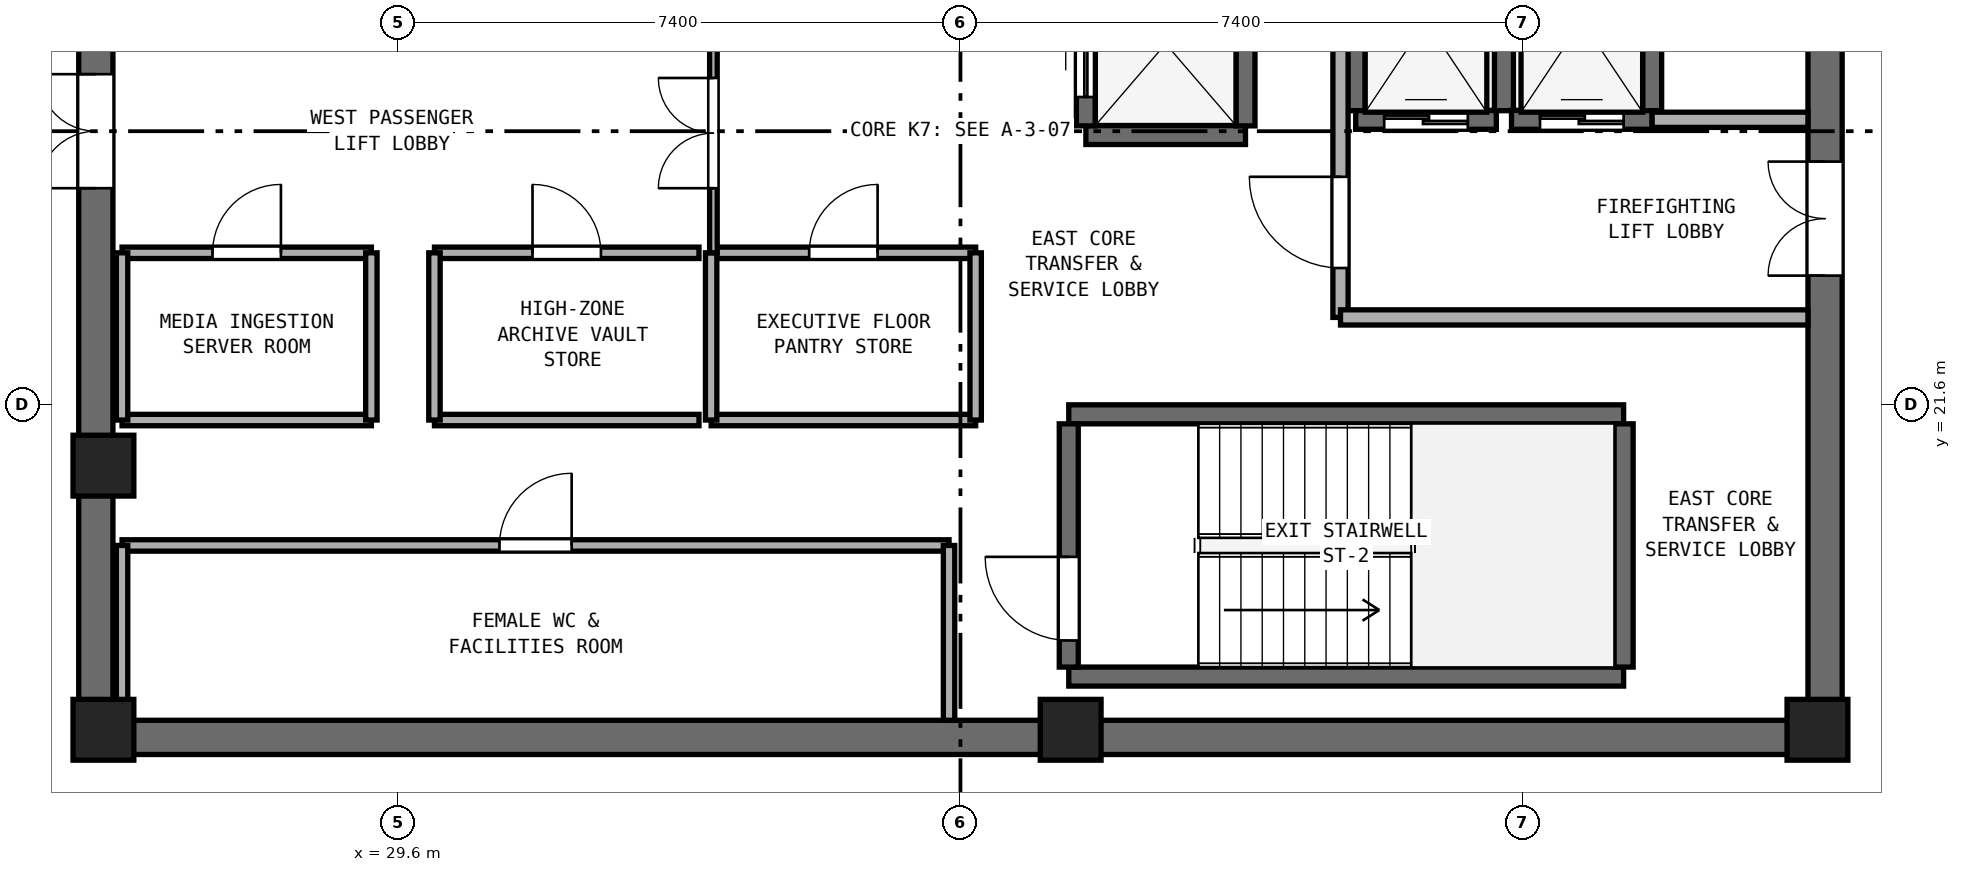
"""IFC4 building model, lengths in metres.
Left out: names, types, materials, properties, quantities, classifications, styles, units other than length and angle.
Written with IfcOpenShell. Run it as: python <this file> out.ifc"""

import sys

from ifc_helpers import new_model, si_unit, direction, frame, frame_2d, origin, origin_2d, place, context, subcontext, project, spatial, rectangle, extrude, element, fill, save


model = new_model("IFC4")
c1 = context("Model", 3, precision=1e-05, world=origin(), true_north=direction((0.0, 1.0)))
c2 = subcontext(c1, "Body", "Model", "MODEL_VIEW")
j1 = project(units=[si_unit("LENGTHUNIT", "METRE"), si_unit("PLANEANGLEUNIT", "RADIAN")], contexts=[c1])
p1 = place(None, origin())
s1 = spatial("IfcSite", under=j1, at=p1, CompositionType="ELEMENT")
p2 = place(p1, origin())
s2 = spatial("IfcBuilding", under=s1, at=p2, CompositionType="ELEMENT")
p3 = place(p2, frame((0.0, 0.0, 247.8)))
s3 = spatial("IfcBuildingStorey", under=s2, at=p3, CompositionType="ELEMENT", Elevation=247.8)
p4 = place(p3, frame((25.4, 17.225, 0.0), z_axis=(0.0, 0.0, 1.0), x_axis=(1.0, 0.0, 0.0)))
e1 = element("IfcWall", 1, at=p4, inside=s3, PredefinedType="SHEAR", context=c2, shape_type="SweptSolid", body=[
    extrude(rectangle(XDim=23.2, YDim=0.45, at=frame_2d((11.6, 0.0))), origin(), (0.0, 0.0, 1.0), 3.51),
])
p5 = place(p3, frame((25.625, 17.45, 0.0), z_axis=(0.0, 0.0, 1.0), x_axis=(0.0, 1.0, 0.0)))
e2 = element("IfcWall", 2, at=p5, inside=s3, PredefinedType="SHEAR", context=c2, shape_type="SweptSolid", body=[
    extrude(rectangle(XDim=15.5, YDim=0.45, at=frame_2d((7.75, 0.0))), origin(), (0.0, 0.0, 1.0), 3.51),
])
p6 = place(p5, frame((7.0, 0.0, 0.0)))
e3 = element("IfcOpeningElement", 3, at=p6, cuts=e2, PredefinedType="OPENING", context=c2, shape_type="SweptSolid", body=[
    extrude(rectangle(XDim=1.5, YDim=2.15, at=frame_2d((0.75, 1.075))), frame((0.0, 0.235, 0.0), z_axis=(0.0, -1.0, 0.0), x_axis=(1.0, 0.0, 0.0)), (0.0, 0.0, 1.0), 0.47),
])
p7 = place(p3, frame((48.375, 17.45, 0.0), z_axis=(0.0, 0.0, 1.0), x_axis=(0.0, 1.0, 0.0)))
e4 = element("IfcWall", 4, at=p7, inside=s3, PredefinedType="SHEAR", context=c2, shape_type="SweptSolid", body=[
    extrude(rectangle(XDim=15.5, YDim=0.45, at=frame_2d((7.75, 0.0))), origin(), (0.0, 0.0, 1.0), 3.51),
])
p8 = place(p7, frame((5.85, 0.0, 0.0)))
e5 = element("IfcOpeningElement", 5, at=p8, cuts=e4, PredefinedType="OPENING", context=c2, shape_type="SweptSolid", body=[
    extrude(rectangle(XDim=1.5, YDim=2.15, at=frame_2d((0.75, 1.075))), frame((0.0, 0.235, 0.0), z_axis=(0.0, -1.0, 0.0), x_axis=(1.0, 0.0, 0.0)), (0.0, 0.0, 1.0), 0.47),
])
for number, where, z_axis, x_axis in (
    (6, (25.725, 17.325, 0.0), (0.0, 0.0, 1.0), (1.0, 0.0, 0.0)),
    (7, (38.45, 17.325, 0.0), (0.0, 0.0, 1.0), (1.0, 0.0, 0.0)),
    (8, (48.275, 17.325, 0.0), (0.0, 0.0, 1.0), (1.0, 0.0, 0.0)),
    (9, (25.725, 20.8, 0.0), (0.0, 0.0, 1.0), (1.0, 0.0, 0.0)),
):
    element("IfcColumn", number, at=place(p3, frame(where, z_axis=z_axis, x_axis=x_axis)), inside=s3, PredefinedType="PILASTER", context=c2, shape_type="SweptSolid", body=[
        extrude(rectangle(XDim=0.8, YDim=0.8, at=origin_2d()), origin(), (0.0, 0.0, 1.0), 3.8),
    ])
for number, where, z_axis, x_axis in (
    (10, (38.425, 18.025, 0.0), (0.0, 0.0, 1.0), (1.0, 0.0, 0.0)),
    (11, (38.425, 21.475, 0.0), (0.0, 0.0, 1.0), (1.0, 0.0, 0.0)),
):
    element("IfcWall", number, at=place(p3, frame(where, z_axis=z_axis, x_axis=x_axis)), inside=s3, PredefinedType="SHEAR", context=c2, shape_type="SweptSolid", body=[
        extrude(rectangle(XDim=7.3, YDim=0.25, at=frame_2d((3.65, 0.0))), origin(), (0.0, 0.0, 1.0), 3.51),
    ])
p9 = place(p3, frame((38.425, 18.15, 0.0), z_axis=(0.0, 0.0, 1.0), x_axis=(0.0, 1.0, 0.0)))
e12 = element("IfcWall", 12, at=p9, inside=s3, PredefinedType="SHEAR", context=c2, shape_type="SweptSolid", body=[
    extrude(rectangle(XDim=3.2, YDim=0.25, at=frame_2d((1.6, 0.0))), origin(), (0.0, 0.0, 1.0), 3.51),
])
p10 = place(p9, frame((0.35, 0.0, 0.0)))
e13 = element("IfcOpeningElement", 13, at=p10, cuts=e12, PredefinedType="OPENING", context=c2, shape_type="SweptSolid", body=[
    extrude(rectangle(XDim=1.1, YDim=2.15, at=frame_2d((0.55, 1.075))), frame((0.0, 0.135, 0.0), z_axis=(0.0, -1.0, 0.0), x_axis=(1.0, 0.0, 0.0)), (0.0, 0.0, 1.0), 0.27),
])
p11 = place(p3, frame((45.725, 18.15, 0.0), z_axis=(0.0, 0.0, 1.0), x_axis=(0.0, 1.0, 0.0)))
e14 = element("IfcWall", 14, at=p11, inside=s3, PredefinedType="SHEAR", context=c2, shape_type="SweptSolid", body=[
    extrude(rectangle(XDim=3.2, YDim=0.25, at=frame_2d((1.6, 0.0))), origin(), (0.0, 0.0, 1.0), 3.51),
])
p12 = place(p3, frame((42.2, 25.35, 0.0), z_axis=(0.0, 0.0, 1.0), x_axis=(1.0, 0.0, 0.0)))
e15 = element("IfcWall", 15, at=p12, inside=s3, PredefinedType="SHEAR", context=c2, shape_type="SweptSolid", body=[
    extrude(rectangle(XDim=1.85, YDim=0.25, at=frame_2d((0.925, 0.0))), origin(), (0.0, 0.0, 1.0), 3.51),
])
p13 = place(p12, frame((0.375, 0.0, 0.0)))
e16 = element("IfcOpeningElement", 16, at=p13, cuts=e15, PredefinedType="OPENING", context=c2, shape_type="SweptSolid", body=[
    extrude(rectangle(XDim=1.1, YDim=2.15, at=frame_2d((0.55, 1.075))), frame((0.0, 0.135, 0.0), z_axis=(0.0, -1.0, 0.0), x_axis=(1.0, 0.0, 0.0)), (0.0, 0.0, 1.0), 0.27),
])
for number, where, z_axis, x_axis in (
    (17, (42.2, 25.47, 0.0), (0.0, 0.0, 1.0), (0.0, 1.0, 0.0)),
    (18, (44.15, 25.47, 0.0), (0.0, 0.0, 1.0), (0.0, 1.0, 0.0)),
):
    element("IfcWall", number, at=place(p3, frame(where, z_axis=z_axis, x_axis=x_axis)), inside=s3, PredefinedType="SHEAR", context=c2, shape_type="SweptSolid", body=[
        extrude(rectangle(XDim=2.36, YDim=0.25, at=frame_2d((1.18, 0.0))), origin(), (0.0, 0.0, 1.0), 3.51),
    ])
p14 = place(p3, frame((44.25, 25.35, 0.0), z_axis=(0.0, 0.0, 1.0), x_axis=(1.0, 0.0, 0.0)))
e19 = element("IfcWall", 19, at=p14, inside=s3, PredefinedType="SHEAR", context=c2, shape_type="SweptSolid", body=[
    extrude(rectangle(XDim=1.85, YDim=0.25, at=frame_2d((0.925, 0.0))), origin(), (0.0, 0.0, 1.0), 3.51),
])
p15 = place(p14, frame((0.375, 0.0, 0.0)))
e20 = element("IfcOpeningElement", 20, at=p15, cuts=e19, PredefinedType="OPENING", context=c2, shape_type="SweptSolid", body=[
    extrude(rectangle(XDim=1.1, YDim=2.15, at=frame_2d((0.55, 1.075))), frame((0.0, 0.135, 0.0), z_axis=(0.0, -1.0, 0.0), x_axis=(1.0, 0.0, 0.0)), (0.0, 0.0, 1.0), 0.27),
])
p16 = place(p3, frame((46.1, 25.47, 0.0), z_axis=(0.0, 0.0, 1.0), x_axis=(0.0, 1.0, 0.0)))
e21 = element("IfcWall", 21, at=p16, inside=s3, PredefinedType="SHEAR", context=c2, shape_type="SweptSolid", body=[
    extrude(rectangle(XDim=2.36, YDim=0.25, at=frame_2d((1.18, 0.0))), origin(), (0.0, 0.0, 1.0), 3.51),
])
p17 = place(p3, frame((38.65, 25.15, 0.0), z_axis=(0.0, 0.0, 1.0), x_axis=(1.0, 0.0, 0.0)))
e22 = element("IfcWall", 22, at=p17, inside=s3, PredefinedType="SHEAR", context=c2, shape_type="SweptSolid", body=[
    extrude(rectangle(XDim=2.1, YDim=0.25, at=frame_2d((1.05, 0.0))), origin(), (0.0, 0.0, 1.0), 3.51),
])
p18 = place(p3, frame((38.65, 25.27, 0.0), z_axis=(0.0, 0.0, 1.0), x_axis=(0.0, 1.0, 0.0)))
e23 = element("IfcWall", 23, at=p18, inside=s3, PredefinedType="SHEAR", context=c2, shape_type="SweptSolid", body=[
    extrude(rectangle(XDim=2.16, YDim=0.25, at=frame_2d((1.08, 0.0))), origin(), (0.0, 0.0, 1.0), 3.51),
])
p19 = place(p18, frame((0.38, 0.0, 0.0)))
e24 = element("IfcOpeningElement", 24, at=p19, cuts=e23, PredefinedType="OPENING", context=c2, shape_type="SweptSolid", body=[
    extrude(rectangle(XDim=1.4, YDim=2.2, at=frame_2d((0.7, 1.1))), frame((0.0, 0.135, 0.0), z_axis=(0.0, -1.0, 0.0), x_axis=(1.0, 0.0, 0.0)), (0.0, 0.0, 1.0), 0.27),
])
p20 = place(p3, frame((40.75, 25.27, 0.0), z_axis=(0.0, 0.0, 1.0), x_axis=(0.0, 1.0, 0.0)))
e25 = element("IfcWall", 25, at=p20, inside=s3, PredefinedType="SHEAR", context=c2, shape_type="SweptSolid", body=[
    extrude(rectangle(XDim=2.16, YDim=0.25, at=frame_2d((1.08, 0.0))), origin(), (0.0, 0.0, 1.0), 3.51),
])
p21 = place(p3, frame((42.0, 22.75, 0.0), z_axis=(0.0, 0.0, 1.0), x_axis=(0.0, 1.0, 0.0)))
e26 = element("IfcWall", 26, at=p21, inside=s3, PredefinedType="SOLIDWALL", context=c2, shape_type="SweptSolid", body=[
    extrude(rectangle(XDim=6.05, YDim=0.2, at=frame_2d((3.025, 0.0))), origin(), (0.0, 0.0, 1.0), 3.51),
])
p22 = place(p21, frame((0.65, 0.0, 0.0)))
e27 = element("IfcOpeningElement", 27, at=p22, cuts=e26, PredefinedType="OPENING", context=c2, shape_type="SweptSolid", body=[
    extrude(rectangle(XDim=1.2, YDim=2.15, at=frame_2d((0.6, 1.075))), frame((0.0, 0.11, 0.0), z_axis=(0.0, -1.0, 0.0), x_axis=(1.0, 0.0, 0.0)), (0.0, 0.0, 1.0), 0.22),
])
p23 = place(p3, frame((42.0, 22.75, 0.0), z_axis=(0.0, 0.0, 1.0), x_axis=(1.0, 0.0, 0.0)))
e28 = element("IfcWall", 28, at=p23, inside=s3, PredefinedType="SOLIDWALL", context=c2, shape_type="SweptSolid", body=[
    extrude(rectangle(XDim=6.15, YDim=0.2, at=frame_2d((3.075, 0.0))), origin(), (0.0, 0.0, 1.0), 3.51),
])
p24 = place(p3, frame((46.1, 25.35, 0.0), z_axis=(0.0, 0.0, 1.0), x_axis=(1.0, 0.0, 0.0)))
e29 = element("IfcWall", 29, at=p24, inside=s3, PredefinedType="SOLIDWALL", context=c2, shape_type="SweptSolid", body=[
    extrude(rectangle(XDim=2.05, YDim=0.2, at=frame_2d((1.025, 0.0))), origin(), (0.0, 0.0, 1.0), 3.51),
])
p25 = place(p3, frame((25.97, 19.75, 0.0), z_axis=(0.0, 0.0, 1.0), x_axis=(1.0, 0.0, 0.0)))
e30 = element("IfcWall", 30, at=p25, inside=s3, PredefinedType="PARTITIONING", context=c2, shape_type="SweptSolid", body=[
    extrude(rectangle(XDim=10.88, YDim=0.15, at=frame_2d((5.44, 0.0))), origin(), (0.0, 0.0, 1.0), 3.51),
])
p26 = place(p25, frame((4.965, 0.0, 0.0)))
e31 = element("IfcOpeningElement", 31, at=p26, cuts=e30, PredefinedType="OPENING", context=c2, shape_type="SweptSolid", body=[
    extrude(rectangle(XDim=0.95, YDim=2.1, at=frame_2d((0.475, 1.05))), frame((0.0, 0.085, 0.0), z_axis=(0.0, -1.0, 0.0), x_axis=(1.0, 0.0, 0.0)), (0.0, 0.0, 1.0), 0.17),
])
p27 = place(p3, frame((25.97, 17.45, 0.0), z_axis=(0.0, 0.0, 1.0), x_axis=(0.0, 1.0, 0.0)))
e32 = element("IfcWall", 32, at=p27, inside=s3, PredefinedType="PARTITIONING", context=c2, shape_type="SweptSolid", body=[
    extrude(rectangle(XDim=2.3, YDim=0.15, at=frame_2d((1.15, 0.0))), origin(), (0.0, 0.0, 1.0), 2.61),
])
p28 = place(p3, frame((36.85, 17.45, 0.0), z_axis=(0.0, 0.0, 1.0), x_axis=(0.0, 1.0, 0.0)))
e33 = element("IfcWall", 33, at=p28, inside=s3, PredefinedType="PARTITIONING", context=c2, shape_type="SweptSolid", body=[
    extrude(rectangle(XDim=2.3, YDim=0.15, at=frame_2d((1.15, 0.0))), origin(), (0.0, 0.0, 1.0), 3.51),
])
p29 = place(p3, frame((25.97, 21.4, 0.0), z_axis=(0.0, 0.0, 1.0), x_axis=(1.0, 0.0, 0.0)))
e34 = element("IfcWall", 34, at=p29, inside=s3, PredefinedType="PARTITIONING", context=c2, shape_type="SweptSolid", body=[
    extrude(rectangle(XDim=3.28, YDim=0.15, at=frame_2d((1.64, 0.0))), origin(), (0.0, 0.0, 1.0), 3.51),
])
p30 = place(p3, frame((25.97, 23.6, 0.0), z_axis=(0.0, 0.0, 1.0), x_axis=(1.0, 0.0, 0.0)))
e35 = element("IfcWall", 35, at=p30, inside=s3, PredefinedType="PARTITIONING", context=c2, shape_type="SweptSolid", body=[
    extrude(rectangle(XDim=3.28, YDim=0.15, at=frame_2d((1.64, 0.0))), origin(), (0.0, 0.0, 1.0), 3.51),
])
p31 = place(p30, frame((1.19, 0.0, 0.0)))
e36 = element("IfcOpeningElement", 36, at=p31, cuts=e35, PredefinedType="OPENING", context=c2, shape_type="SweptSolid", body=[
    extrude(rectangle(XDim=0.9, YDim=2.1, at=frame_2d((0.45, 1.05))), frame((0.0, 0.085, 0.0), z_axis=(0.0, -1.0, 0.0), x_axis=(1.0, 0.0, 0.0)), (0.0, 0.0, 1.0), 0.17),
])
p32 = place(p3, frame((25.97, 21.4, 0.0), z_axis=(0.0, 0.0, 1.0), x_axis=(0.0, 1.0, 0.0)))
e37 = element("IfcWall", 37, at=p32, inside=s3, PredefinedType="PARTITIONING", context=c2, shape_type="SweptSolid", body=[
    extrude(rectangle(XDim=2.2, YDim=0.15, at=frame_2d((1.1, 0.0))), origin(), (0.0, 0.0, 1.0), 2.61),
])
p33 = place(p3, frame((29.25, 21.4, 0.0), z_axis=(0.0, 0.0, 1.0), x_axis=(0.0, 1.0, 0.0)))
e38 = element("IfcWall", 38, at=p33, inside=s3, PredefinedType="PARTITIONING", context=c2, shape_type="SweptSolid", body=[
    extrude(rectangle(XDim=2.2, YDim=0.15, at=frame_2d((1.1, 0.0))), origin(), (0.0, 0.0, 1.0), 3.51),
])
p34 = place(p3, frame((30.08, 21.4, 0.0), z_axis=(0.0, 0.0, 1.0), x_axis=(1.0, 0.0, 0.0)))
e39 = element("IfcWall", 39, at=p34, inside=s3, PredefinedType="PARTITIONING", context=c2, shape_type="SweptSolid", body=[
    extrude(rectangle(XDim=3.48, YDim=0.15, at=frame_2d((1.74, 0.0))), origin(), (0.0, 0.0, 1.0), 3.51),
])
p35 = place(p3, frame((30.08, 23.6, 0.0), z_axis=(0.0, 0.0, 1.0), x_axis=(1.0, 0.0, 0.0)))
e40 = element("IfcWall", 40, at=p35, inside=s3, PredefinedType="PARTITIONING", context=c2, shape_type="SweptSolid", body=[
    extrude(rectangle(XDim=3.48, YDim=0.15, at=frame_2d((1.74, 0.0))), origin(), (0.0, 0.0, 1.0), 3.51),
])
p36 = place(p35, frame((1.29, 0.0, 0.0)))
e41 = element("IfcOpeningElement", 41, at=p36, cuts=e40, PredefinedType="OPENING", context=c2, shape_type="SweptSolid", body=[
    extrude(rectangle(XDim=0.9, YDim=2.1, at=frame_2d((0.45, 1.05))), frame((0.0, 0.085, 0.0), z_axis=(0.0, -1.0, 0.0), x_axis=(1.0, 0.0, 0.0)), (0.0, 0.0, 1.0), 0.17),
])
p37 = place(p3, frame((30.08, 21.4, 0.0), z_axis=(0.0, 0.0, 1.0), x_axis=(0.0, 1.0, 0.0)))
e42 = element("IfcWall", 42, at=p37, inside=s3, PredefinedType="PARTITIONING", context=c2, shape_type="SweptSolid", body=[
    extrude(rectangle(XDim=2.2, YDim=0.15, at=frame_2d((1.1, 0.0))), origin(), (0.0, 0.0, 1.0), 3.51),
])
p38 = place(p3, frame((33.72, 21.4, 0.0), z_axis=(0.0, 0.0, 1.0), x_axis=(1.0, 0.0, 0.0)))
e43 = element("IfcWall", 43, at=p38, inside=s3, PredefinedType="PARTITIONING", context=c2, shape_type="SweptSolid", body=[
    extrude(rectangle(XDim=3.48, YDim=0.15, at=frame_2d((1.74, 0.0))), origin(), (0.0, 0.0, 1.0), 3.51),
])
p39 = place(p3, frame((33.72, 23.6, 0.0), z_axis=(0.0, 0.0, 1.0), x_axis=(1.0, 0.0, 0.0)))
e44 = element("IfcWall", 44, at=p39, inside=s3, PredefinedType="PARTITIONING", context=c2, shape_type="SweptSolid", body=[
    extrude(rectangle(XDim=3.48, YDim=0.15, at=frame_2d((1.74, 0.0))), origin(), (0.0, 0.0, 1.0), 3.51),
])
p40 = place(p39, frame((1.29, 0.0, 0.0)))
e45 = element("IfcOpeningElement", 45, at=p40, cuts=e44, PredefinedType="OPENING", context=c2, shape_type="SweptSolid", body=[
    extrude(rectangle(XDim=0.9, YDim=2.1, at=frame_2d((0.45, 1.05))), frame((0.0, 0.085, 0.0), z_axis=(0.0, -1.0, 0.0), x_axis=(1.0, 0.0, 0.0)), (0.0, 0.0, 1.0), 0.17),
])
for number, where, z_axis, x_axis in (
    (46, (33.72, 21.4, 0.0), (0.0, 0.0, 1.0), (0.0, 1.0, 0.0)),
    (47, (37.2, 21.4, 0.0), (0.0, 0.0, 1.0), (0.0, 1.0, 0.0)),
):
    element("IfcWall", number, at=place(p3, frame(where, z_axis=z_axis, x_axis=x_axis)), inside=s3, PredefinedType="PARTITIONING", context=c2, shape_type="SweptSolid", body=[
        extrude(rectangle(XDim=2.2, YDim=0.15, at=frame_2d((1.1, 0.0))), origin(), (0.0, 0.0, 1.0), 3.51),
    ])
p41 = place(p3, frame((33.75, 23.6, 0.0), z_axis=(0.0, 0.0, 1.0), x_axis=(0.0, 1.0, 0.0)))
e48 = element("IfcWall", 48, at=p41, inside=s3, PredefinedType="PARTITIONING", context=c2, shape_type="SweptSolid", body=[
    extrude(rectangle(XDim=3.2, YDim=0.1, at=frame_2d((1.6, 0.0))), origin(), (0.0, 0.0, 1.0), 3.51),
])
p42 = place(p41, frame((0.85, 0.0, 0.0)))
e49 = element("IfcOpeningElement", 49, at=p42, cuts=e48, PredefinedType="OPENING", context=c2, shape_type="SweptSolid", body=[
    extrude(rectangle(XDim=1.45, YDim=2.12, at=frame_2d((0.725, 1.06))), frame((0.0, 0.06, 0.0), z_axis=(0.0, -1.0, 0.0), x_axis=(1.0, 0.0, 0.0)), (0.0, 0.0, 1.0), 0.12),
])
p43 = place(p10, origin())
e50 = element("IfcDoor", 50, at=p43, inside=s3, OperationType="SINGLE_SWING_RIGHT", PredefinedType="DOOR", context=c2, shape_type="SweptSolid", body=[
    extrude(rectangle(XDim=1.1, YDim=2.15, at=frame_2d((0.55, 1.075))), frame((0.0, 0.025, 0.0), z_axis=(0.0, -1.0, 0.0), x_axis=(1.0, 0.0, 0.0)), (0.0, 0.0, 1.0), 0.05),
])
fill(e13, e50)
p44 = place(p13, origin())
e51 = element("IfcDoor", 51, at=p44, inside=s3, OperationType="DOUBLE_DOOR_SLIDING", PredefinedType="DOOR", context=c2, shape_type="SweptSolid", body=[
    extrude(rectangle(XDim=1.1, YDim=2.15, at=frame_2d((0.55, 1.075))), frame((0.0, 0.025, 0.0), z_axis=(0.0, -1.0, 0.0), x_axis=(1.0, 0.0, 0.0)), (0.0, 0.0, 1.0), 0.05),
])
fill(e16, e51)
p45 = place(p15, origin())
e52 = element("IfcDoor", 52, at=p45, inside=s3, OperationType="DOUBLE_DOOR_SLIDING", PredefinedType="DOOR", context=c2, shape_type="SweptSolid", body=[
    extrude(rectangle(XDim=1.1, YDim=2.15, at=frame_2d((0.55, 1.075))), frame((0.0, 0.025, 0.0), z_axis=(0.0, -1.0, 0.0), x_axis=(1.0, 0.0, 0.0)), (0.0, 0.0, 1.0), 0.05),
])
fill(e20, e52)
p46 = place(p19, origin())
e53 = element("IfcDoor", 53, at=p46, inside=s3, OperationType="DOUBLE_DOOR_SLIDING", PredefinedType="DOOR", context=c2, shape_type="SweptSolid", body=[
    extrude(rectangle(XDim=1.4, YDim=2.2, at=frame_2d((0.7, 1.1))), frame((0.0, 0.025, 0.0), z_axis=(0.0, -1.0, 0.0), x_axis=(1.0, 0.0, 0.0)), (0.0, 0.0, 1.0), 0.05),
])
fill(e24, e53)
p47 = place(p22, origin())
e54 = element("IfcDoor", 54, at=p47, inside=s3, OperationType="SINGLE_SWING_RIGHT", PredefinedType="DOOR", context=c2, shape_type="SweptSolid", body=[
    extrude(rectangle(XDim=1.2, YDim=2.15, at=frame_2d((0.6, 1.075))), frame((0.0, 0.025, 0.0), z_axis=(0.0, -1.0, 0.0), x_axis=(1.0, 0.0, 0.0)), (0.0, 0.0, 1.0), 0.05),
])
fill(e27, e54)
p48 = place(p6, origin())
e55 = element("IfcDoor", 55, at=p48, inside=s3, OperationType="DOUBLE_DOOR_SINGLE_SWING", PredefinedType="DOOR", context=c2, shape_type="SweptSolid", body=[
    extrude(rectangle(XDim=1.5, YDim=2.15, at=frame_2d((0.75, 1.075))), frame((0.0, 0.025, 0.0), z_axis=(0.0, -1.0, 0.0), x_axis=(1.0, 0.0, 0.0)), (0.0, 0.0, 1.0), 0.05),
])
fill(e3, e55)
p49 = place(p8, origin())
e56 = element("IfcDoor", 56, at=p49, inside=s3, OperationType="DOUBLE_DOOR_SINGLE_SWING", PredefinedType="DOOR", context=c2, shape_type="SweptSolid", body=[
    extrude(rectangle(XDim=1.5, YDim=2.15, at=frame_2d((0.75, 1.075))), frame((0.0, 0.025, 0.0), z_axis=(0.0, -1.0, 0.0), x_axis=(1.0, 0.0, 0.0)), (0.0, 0.0, 1.0), 0.05),
])
fill(e5, e56)
p50 = place(p26, origin())
e57 = element("IfcDoor", 57, at=p50, inside=s3, OperationType="SINGLE_SWING_RIGHT", PredefinedType="DOOR", context=c2, shape_type="SweptSolid", body=[
    extrude(rectangle(XDim=0.95, YDim=2.1, at=frame_2d((0.475, 1.05))), frame((0.0, 0.025, 0.0), z_axis=(0.0, -1.0, 0.0), x_axis=(1.0, 0.0, 0.0)), (0.0, 0.0, 1.0), 0.05),
])
fill(e31, e57)
p51 = place(p31, origin())
e58 = element("IfcDoor", 58, at=p51, inside=s3, OperationType="SINGLE_SWING_RIGHT", PredefinedType="DOOR", context=c2, shape_type="SweptSolid", body=[
    extrude(rectangle(XDim=0.9, YDim=2.1, at=frame_2d((0.45, 1.05))), frame((0.0, 0.025, 0.0), z_axis=(0.0, -1.0, 0.0), x_axis=(1.0, 0.0, 0.0)), (0.0, 0.0, 1.0), 0.05),
])
fill(e36, e58)
p52 = place(p36, origin())
e59 = element("IfcDoor", 59, at=p52, inside=s3, OperationType="SINGLE_SWING_LEFT", PredefinedType="DOOR", context=c2, shape_type="SweptSolid", body=[
    extrude(rectangle(XDim=0.9, YDim=2.1, at=frame_2d((0.45, 1.05))), frame((0.0, 0.025, 0.0), z_axis=(0.0, -1.0, 0.0), x_axis=(1.0, 0.0, 0.0)), (0.0, 0.0, 1.0), 0.05),
])
fill(e41, e59)
p53 = place(p40, origin())
e60 = element("IfcDoor", 60, at=p53, inside=s3, OperationType="SINGLE_SWING_RIGHT", PredefinedType="DOOR", context=c2, shape_type="SweptSolid", body=[
    extrude(rectangle(XDim=0.9, YDim=2.1, at=frame_2d((0.45, 1.05))), frame((0.0, 0.025, 0.0), z_axis=(0.0, -1.0, 0.0), x_axis=(1.0, 0.0, 0.0)), (0.0, 0.0, 1.0), 0.05),
])
fill(e45, e60)
p54 = place(p42, origin())
e61 = element("IfcDoor", 61, at=p54, inside=s3, OperationType="DOUBLE_DOOR_SINGLE_SWING", PredefinedType="DOOR", context=c2, shape_type="SweptSolid", body=[
    extrude(rectangle(XDim=1.45, YDim=2.12, at=frame_2d((0.725, 1.06))), frame((0.0, 0.025, 0.0), z_axis=(0.0, -1.0, 0.0), x_axis=(1.0, 0.0, 0.0)), (0.0, 0.0, 1.0), 0.05),
])
fill(e49, e61)
save(model, sys.argv[1])
